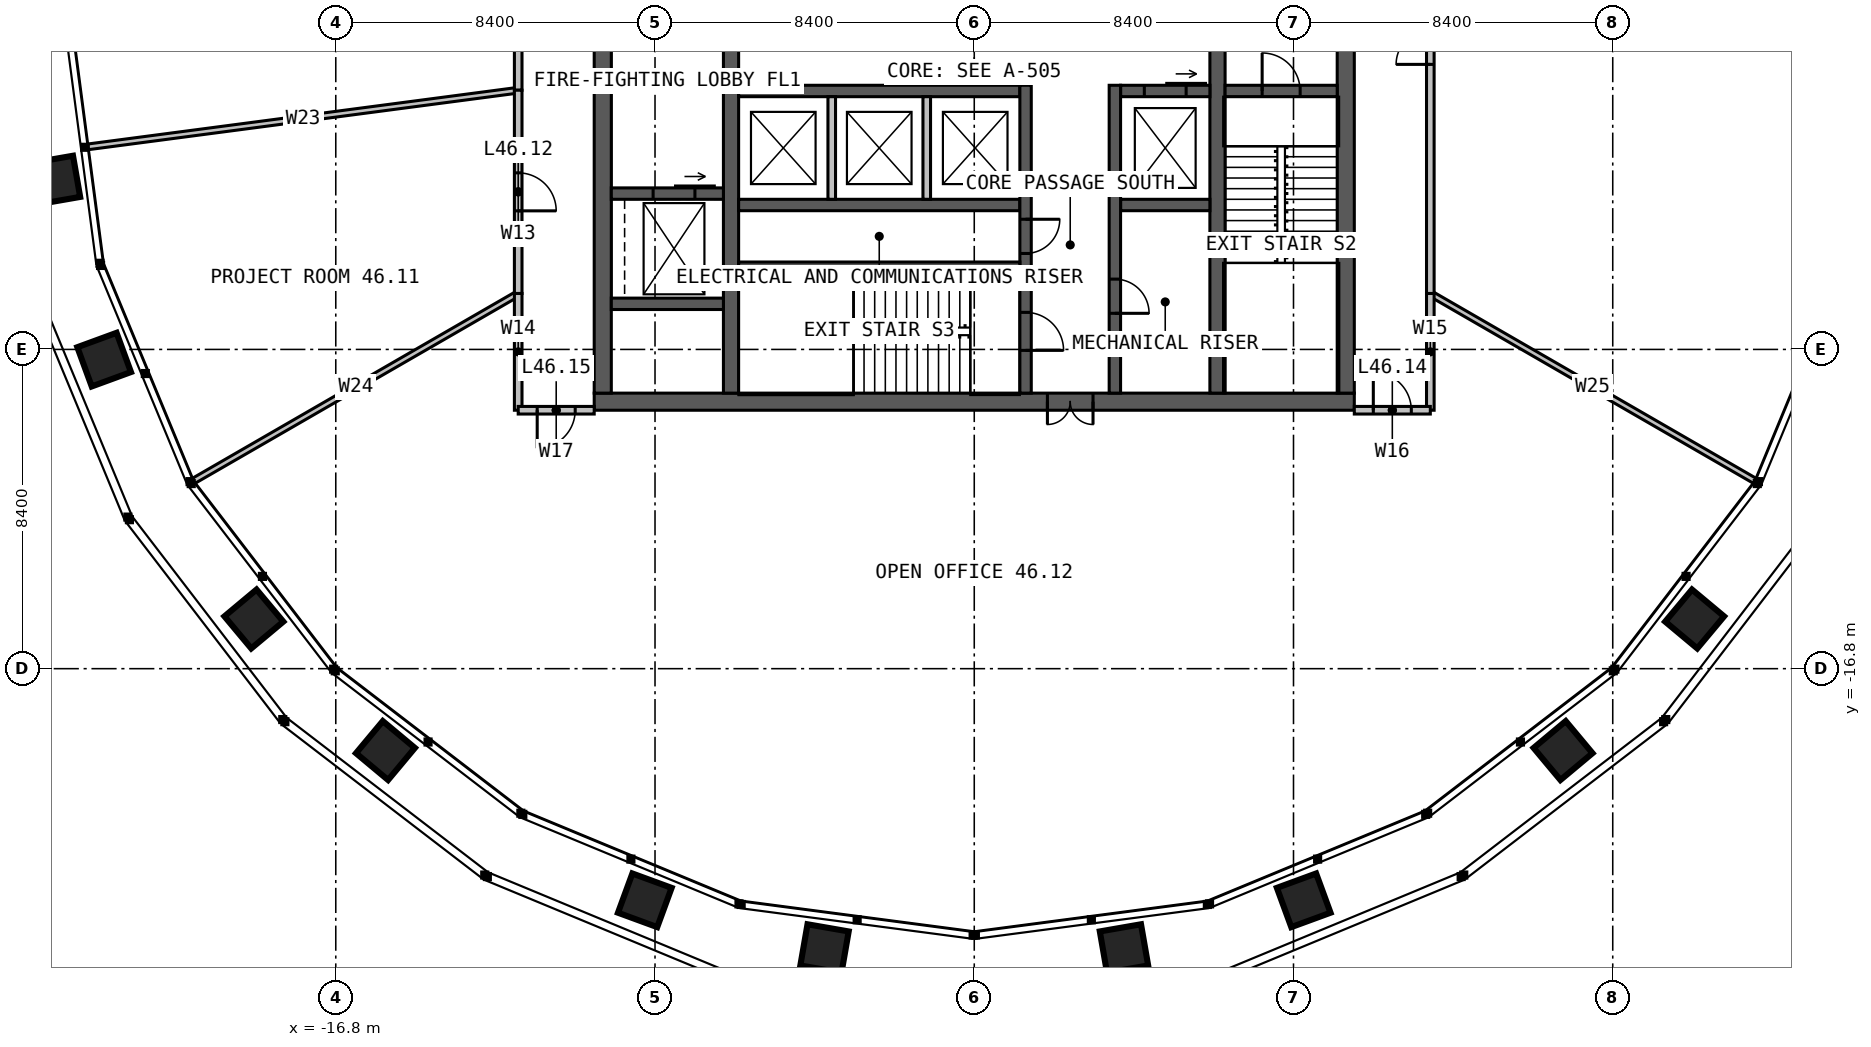
"""IFC4 building model, lengths in metres.
Left out: names, types, materials, properties, quantities, classifications, styles, units other than length and angle.
Written with IfcOpenShell. Run it as: python <this file> out.ifc"""

import sys

from ifc_helpers import new_model, si_unit, direction, frame, frame_2d, origin, place, context, subcontext, project, spatial, rectangle, extrude, element, fill, save


model = new_model("IFC4")
c1 = context("Model", 3, precision=1e-05, world=origin(), true_north=direction((0.0, 1.0)))
c2 = subcontext(c1, "Body", "Model", "MODEL_VIEW")
j1 = project(units=[si_unit("LENGTHUNIT", "METRE"), si_unit("PLANEANGLEUNIT", "RADIAN")], contexts=[c1])
p1 = place(None, origin())
s1 = spatial("IfcSite", under=j1, at=p1, CompositionType="ELEMENT")
p2 = place(p1, origin())
s2 = spatial("IfcBuilding", under=s1, at=p2, CompositionType="ELEMENT")
p3 = place(p2, frame((0.0, 0.0, 191.0)))
s3 = spatial("IfcBuildingStorey", under=s2, at=p3, CompositionType="ELEMENT", Elevation=191.0)
p4 = place(p3, frame((10.0, -9.775, 0.0), z_axis=(0.0, 0.0, 1.0), x_axis=(-1.0, 0.0, 0.0)))
e1 = element("IfcWall", 1, at=p4, inside=s3, PredefinedType="SOLIDWALL", context=c2, shape_type="SweptSolid", body=[
    extrude(rectangle(XDim=20.0, YDim=0.45, at=frame_2d((10.0, 0.0))), origin(), (0.0, 0.0, 1.0), 4.0),
])
p5 = place(p4, frame((6.875, 0.0, 0.0)))
e2 = element("IfcOpeningElement", 2, at=p5, cuts=e1, PredefinedType="OPENING", context=c2, shape_type="SweptSolid", body=[
    extrude(rectangle(XDim=1.2, YDim=2.2, at=frame_2d((0.6, 1.1))), frame((0.0, 0.235, 0.0), z_axis=(0.0, -1.0, 0.0), x_axis=(1.0, 0.0, 0.0)), (0.0, 0.0, 1.0), 0.47),
])
for number, where, z_axis, x_axis in (
    (3, (9.775, -9.55, 0.0), (0.0, 0.0, 1.0), (0.0, 1.0, 0.0)),
    (4, (-9.775, 9.55, 0.0), (0.0, 0.0, 1.0), (0.0, -1.0, 0.0)),
):
    element("IfcWall", number, at=place(p3, frame(where, z_axis=z_axis, x_axis=x_axis)), inside=s3, PredefinedType="SOLIDWALL", context=c2, shape_type="SweptSolid", body=[
        extrude(rectangle(XDim=19.1, YDim=0.45, at=frame_2d((9.55, 0.0))), origin(), (0.0, 0.0, 1.0), 4.0),
    ])
p6 = place(p3, frame((-6.4, -9.55, 0.0), z_axis=(0.0, 0.0, 1.0), x_axis=(0.0, 1.0, 0.0)))
e5 = element("IfcWall", 5, at=p6, inside=s3, PredefinedType="SOLIDWALL", context=c2, shape_type="SweptSolid", body=[
    extrude(rectangle(XDim=19.1, YDim=0.4, at=frame_2d((9.55, 0.0))), origin(), (0.0, 0.0, 1.0), 4.0),
])
p7 = place(p6, frame((9.05, 0.0, 0.0)))
e6 = element("IfcOpeningElement", 6, at=p7, cuts=e5, PredefinedType="OPENING", context=c2, shape_type="SweptSolid", body=[
    extrude(rectangle(XDim=1.0, YDim=2.2, at=frame_2d((0.5, 1.1))), frame((0.0, 0.21, 0.0), z_axis=(0.0, -1.0, 0.0), x_axis=(1.0, 0.0, 0.0)), (0.0, 0.0, 1.0), 0.42),
])
p8 = place(p3, frame((6.4, 9.55, 0.0), z_axis=(0.0, 0.0, 1.0), x_axis=(0.0, -1.0, 0.0)))
e7 = element("IfcWall", 7, at=p8, inside=s3, PredefinedType="SOLIDWALL", context=c2, shape_type="SweptSolid", body=[
    extrude(rectangle(XDim=19.1, YDim=0.4, at=frame_2d((9.55, 0.0))), origin(), (0.0, 0.0, 1.0), 4.0),
])
p9 = place(p8, frame((9.05, 0.0, 0.0)))
e8 = element("IfcOpeningElement", 8, at=p9, cuts=e7, PredefinedType="OPENING", context=c2, shape_type="SweptSolid", body=[
    extrude(rectangle(XDim=1.0, YDim=2.2, at=frame_2d((0.5, 1.1))), frame((0.0, 0.21, 0.0), z_axis=(0.0, -1.0, 0.0), x_axis=(1.0, 0.0, 0.0)), (0.0, 0.0, 1.0), 0.42),
])
p10 = place(p3, frame((-6.2, -1.6, 0.0), z_axis=(0.0, 0.0, 1.0), x_axis=(1.0, 0.0, 0.0)))
e9 = element("IfcWall", 9, at=p10, inside=s3, PredefinedType="SOLIDWALL", context=c2, shape_type="SweptSolid", body=[
    extrude(rectangle(XDim=7.4, YDim=0.3, at=frame_2d((3.7, 0.0))), origin(), (0.0, 0.0, 1.0), 4.0),
])
p11 = place(p3, frame((3.85, -1.6, 0.0), z_axis=(0.0, 0.0, 1.0), x_axis=(1.0, 0.0, 0.0)))
e10 = element("IfcWall", 10, at=p11, inside=s3, PredefinedType="SOLIDWALL", context=c2, shape_type="SweptSolid", body=[
    extrude(rectangle(XDim=2.35, YDim=0.3, at=frame_2d((1.175, 0.0))), origin(), (0.0, 0.0, 1.0), 4.0),
])
p12 = place(p11, frame((0.625, 0.0, 0.0)))
e11 = element("IfcOpeningElement", 11, at=p12, cuts=e10, PredefinedType="OPENING", context=c2, shape_type="SweptSolid", body=[
    extrude(rectangle(XDim=1.1, YDim=2.2, at=frame_2d((0.55, 1.1))), frame((0.0, 0.16, 0.0), z_axis=(0.0, -1.0, 0.0), x_axis=(1.0, 0.0, 0.0)), (0.0, 0.0, 1.0), 0.32),
])
p13 = place(p3, frame((-6.2, -4.6, 0.0), z_axis=(0.0, 0.0, 1.0), x_axis=(1.0, 0.0, 0.0)))
e12 = element("IfcWall", 12, at=p13, inside=s3, PredefinedType="SOLIDWALL", context=c2, shape_type="SweptSolid", body=[
    extrude(rectangle(XDim=7.4, YDim=0.3, at=frame_2d((3.7, 0.0))), origin(), (0.0, 0.0, 1.0), 4.0),
])
p14 = place(p3, frame((3.85, -4.6, 0.0), z_axis=(0.0, 0.0, 1.0), x_axis=(1.0, 0.0, 0.0)))
e13 = element("IfcWall", 13, at=p14, inside=s3, PredefinedType="SOLIDWALL", context=c2, shape_type="SweptSolid", body=[
    extrude(rectangle(XDim=2.35, YDim=0.3, at=frame_2d((1.175, 0.0))), origin(), (0.0, 0.0, 1.0), 4.0),
])
p15 = place(p3, frame((1.35, -1.45, 0.0), z_axis=(0.0, 0.0, 1.0), x_axis=(0.0, -1.0, 0.0)))
e14 = element("IfcWall", 14, at=p15, inside=s3, PredefinedType="SOLIDWALL", context=c2, shape_type="SweptSolid", body=[
    extrude(rectangle(XDim=8.1, YDim=0.3, at=frame_2d((4.05, 0.0))), origin(), (0.0, 0.0, 1.0), 4.0),
])
p16 = place(p15, frame((5.975, 0.0, 0.0)))
e15 = element("IfcOpeningElement", 15, at=p16, cuts=e14, PredefinedType="OPENING", context=c2, shape_type="SweptSolid", body=[
    extrude(rectangle(XDim=1.0, YDim=2.2, at=frame_2d((0.5, 1.1))), frame((0.0, 0.16, 0.0), z_axis=(0.0, -1.0, 0.0), x_axis=(1.0, 0.0, 0.0)), (0.0, 0.0, 1.0), 0.32),
])
p17 = place(p15, frame((3.525, 0.0, 0.0)))
e16 = element("IfcOpeningElement", 16, at=p17, cuts=e14, PredefinedType="OPENING", context=c2, shape_type="SweptSolid", body=[
    extrude(rectangle(XDim=0.9, YDim=2.2, at=frame_2d((0.45, 1.1))), frame((0.0, 0.16, 0.0), z_axis=(0.0, -1.0, 0.0), x_axis=(1.0, 0.0, 0.0)), (0.0, 0.0, 1.0), 0.32),
])
p18 = place(p3, frame((3.7, -1.45, 0.0), z_axis=(0.0, 0.0, 1.0), x_axis=(0.0, -1.0, 0.0)))
e17 = element("IfcWall", 17, at=p18, inside=s3, PredefinedType="SOLIDWALL", context=c2, shape_type="SweptSolid", body=[
    extrude(rectangle(XDim=8.1, YDim=0.3, at=frame_2d((4.05, 0.0))), origin(), (0.0, 0.0, 1.0), 4.0),
])
p19 = place(p18, frame((5.1, 0.0, 0.0)))
e18 = element("IfcOpeningElement", 18, at=p19, cuts=e17, PredefinedType="OPENING", context=c2, shape_type="SweptSolid", body=[
    extrude(rectangle(XDim=0.9, YDim=2.2, at=frame_2d((0.45, 1.1))), frame((0.0, 0.16, 0.0), z_axis=(0.0, -1.0, 0.0), x_axis=(1.0, 0.0, 0.0)), (0.0, 0.0, 1.0), 0.32),
])
p20 = place(p3, frame((-6.2, -6.2, 0.0), z_axis=(0.0, 0.0, 1.0), x_axis=(1.0, 0.0, 0.0)))
e19 = element("IfcWall", 19, at=p20, inside=s3, PredefinedType="SOLIDWALL", context=c2, shape_type="SweptSolid", body=[
    extrude(rectangle(XDim=7.4, YDim=0.2, at=frame_2d((3.7, 0.0))), origin(), (0.0, 0.0, 1.0), 4.0),
])
p21 = place(p3, frame((6.6, -1.6, 0.0), z_axis=(0.0, 0.0, 1.0), x_axis=(1.0, 0.0, 0.0)))
e20 = element("IfcWall", 20, at=p21, inside=s3, PredefinedType="SOLIDWALL", context=c2, shape_type="SweptSolid", body=[
    extrude(rectangle(XDim=2.95, YDim=0.3, at=frame_2d((1.475, 0.0))), origin(), (0.0, 0.0, 1.0), 4.0),
])
p22 = place(p21, frame((0.975, 0.0, 0.0)))
e21 = element("IfcOpeningElement", 21, at=p22, cuts=e20, PredefinedType="OPENING", context=c2, shape_type="SweptSolid", body=[
    extrude(rectangle(XDim=1.0, YDim=2.2, at=frame_2d((0.5, 1.1))), frame((0.0, 0.16, 0.0), z_axis=(0.0, -1.0, 0.0), x_axis=(1.0, 0.0, 0.0)), (0.0, 0.0, 1.0), 0.32),
])
p23 = place(p3, frame((-9.55, -4.3, 0.0), z_axis=(0.0, 0.0, 1.0), x_axis=(1.0, 0.0, 0.0)))
e22 = element("IfcWall", 22, at=p23, inside=s3, PredefinedType="SOLIDWALL", context=c2, shape_type="SweptSolid", body=[
    extrude(rectangle(XDim=2.95, YDim=0.3, at=frame_2d((1.475, 0.0))), origin(), (0.0, 0.0, 1.0), 4.0),
])
p24 = place(p23, frame((1.1, 0.0, 0.0)))
e23 = element("IfcOpeningElement", 23, at=p24, cuts=e22, PredefinedType="OPENING", context=c2, shape_type="SweptSolid", body=[
    extrude(rectangle(XDim=1.1, YDim=2.2, at=frame_2d((0.55, 1.1))), frame((0.0, 0.16, 0.0), z_axis=(0.0, -1.0, 0.0), x_axis=(1.0, 0.0, 0.0)), (0.0, 0.0, 1.0), 0.32),
])
p25 = place(p3, frame((-9.55, -7.2, 0.0), z_axis=(0.0, 0.0, 1.0), x_axis=(1.0, 0.0, 0.0)))
e24 = element("IfcWall", 24, at=p25, inside=s3, PredefinedType="SOLIDWALL", context=c2, shape_type="SweptSolid", body=[
    extrude(rectangle(XDim=2.95, YDim=0.3, at=frame_2d((1.475, 0.0))), origin(), (0.0, 0.0, 1.0), 4.0),
])
for number, where, z_axis, x_axis in (
    (25, (-3.75, -1.75, 0.0), (0.0, 0.0, 1.0), (0.0, -1.0, 0.0)),
    (26, (-1.25, -1.75, 0.0), (0.0, 0.0, 1.0), (0.0, -1.0, 0.0)),
):
    element("IfcWall", number, at=place(p3, frame(where, z_axis=z_axis, x_axis=x_axis)), inside=s3, PredefinedType="SOLIDWALL", context=c2, shape_type="SweptSolid", body=[
        extrude(rectangle(XDim=2.7, YDim=0.2, at=frame_2d((1.35, 0.0))), origin(), (0.0, 0.0, 1.0), 3.75),
    ])
p26 = place(p3, frame((12.0, -6.928, 0.0), z_axis=(0.0, 0.0, 1.0), x_axis=(0.866027739639, -0.49999595416, 0.0)))
e27 = element("IfcWall", 27, at=p26, inside=s3, PredefinedType="PARTITIONING", context=c2, shape_type="SweptSolid", body=[
    extrude(rectangle(XDim=9.865, YDim=0.15, at=frame_2d((4.932, 0.0))), origin(), (0.0, 0.0, 1.0), 2.79),
])
p27 = place(p3, frame((-12.0, -1.58, 0.0), z_axis=(0.0, 0.0, 1.0), x_axis=(-0.991444173628, -0.130531416064, 0.0)))
e28 = element("IfcWall", 28, at=p27, inside=s3, PredefinedType="PARTITIONING", context=c2, shape_type="SweptSolid", body=[
    extrude(rectangle(XDim=11.415, YDim=0.15, at=frame_2d((5.708, 0.0))), origin(), (0.0, 0.0, 1.0), 2.79),
])
p28 = place(p3, frame((-12.0, -6.928, 0.0), z_axis=(0.0, 0.0, 1.0), x_axis=(-0.866027739639, -0.49999595416, 0.0)))
e29 = element("IfcWall", 29, at=p28, inside=s3, PredefinedType="PARTITIONING", context=c2, shape_type="SweptSolid", body=[
    extrude(rectangle(XDim=9.865, YDim=0.15, at=frame_2d((4.932, 0.0))), origin(), (0.0, 0.0, 1.0), 2.79),
])
p29 = place(p3, frame((12.0, -6.928, 0.0), z_axis=(0.0, 0.0, 1.0), x_axis=(0.0, 1.0, 0.0)))
e30 = element("IfcWall", 30, at=p29, inside=s3, PredefinedType="PARTITIONING", context=c2, shape_type="SweptSolid", body=[
    extrude(rectangle(XDim=13.856, YDim=0.2, at=frame_2d((6.928, 0.0))), origin(), (0.0, 0.0, 1.0), 3.8),
])
p30 = place(p29, frame((6.028, 0.0, 0.0)))
e31 = element("IfcOpeningElement", 31, at=p30, cuts=e30, PredefinedType="OPENING", context=c2, shape_type="SweptSolid", body=[
    extrude(rectangle(XDim=1.8, YDim=2.2, at=frame_2d((0.9, 1.1))), frame((0.0, 0.11, 0.0), z_axis=(0.0, -1.0, 0.0), x_axis=(1.0, 0.0, 0.0)), (0.0, 0.0, 1.0), 0.22),
])
p31 = place(p3, frame((-12.0, 6.928, 0.0), z_axis=(0.0, 0.0, 1.0), x_axis=(0.0, -1.0, 0.0)))
e32 = element("IfcWall", 32, at=p31, inside=s3, PredefinedType="PARTITIONING", context=c2, shape_type="SweptSolid", body=[
    extrude(rectangle(XDim=8.508, YDim=0.2, at=frame_2d((4.254, 0.0))), origin(), (0.0, 0.0, 1.0), 3.8),
])
p32 = place(p31, frame((3.354, 0.0, 0.0)))
e33 = element("IfcOpeningElement", 33, at=p32, cuts=e32, PredefinedType="OPENING", context=c2, shape_type="SweptSolid", body=[
    extrude(rectangle(XDim=1.8, YDim=2.2, at=frame_2d((0.9, 1.1))), frame((0.0, 0.11, 0.0), z_axis=(0.0, -1.0, 0.0), x_axis=(1.0, 0.0, 0.0)), (0.0, 0.0, 1.0), 0.22),
])
p33 = place(p3, frame((-12.0, -1.58, 0.0), z_axis=(0.0, 0.0, 1.0), x_axis=(0.0, -1.0, 0.0)))
e34 = element("IfcWall", 34, at=p33, inside=s3, PredefinedType="PARTITIONING", context=c2, shape_type="SweptSolid", body=[
    extrude(rectangle(XDim=5.348, YDim=0.2, at=frame_2d((2.674, 0.0))), origin(), (0.0, 0.0, 1.0), 3.8),
])
p34 = place(p33, frame((2.174, 0.0, 0.0)))
e35 = element("IfcOpeningElement", 35, at=p34, cuts=e34, PredefinedType="OPENING", context=c2, shape_type="SweptSolid", body=[
    extrude(rectangle(XDim=1.0, YDim=2.2, at=frame_2d((0.5, 1.1))), frame((0.0, 0.11, 0.0), z_axis=(0.0, -1.0, 0.0), x_axis=(1.0, 0.0, 0.0)), (0.0, 0.0, 1.0), 0.22),
])
for number, where, z_axis, x_axis in (
    (36, (-12.0, -6.928, 0.0), (0.0, 0.0, 1.0), (0.0, -1.0, 0.0)),
    (37, (12.0, -10.0, 0.0), (0.0, 0.0, 1.0), (0.0, 1.0, 0.0)),
):
    element("IfcWall", number, at=place(p3, frame(where, z_axis=z_axis, x_axis=x_axis)), inside=s3, PredefinedType="PARTITIONING", context=c2, shape_type="SweptSolid", body=[
        extrude(rectangle(XDim=3.072, YDim=0.2, at=frame_2d((1.536, 0.0))), origin(), (0.0, 0.0, 1.0), 3.8),
    ])
p35 = place(p3, frame((10.0, -10.0, 0.0), z_axis=(0.0, 0.0, 1.0), x_axis=(1.0, 0.0, 0.0)))
e38 = element("IfcWall", 38, at=p35, inside=s3, PredefinedType="PARTITIONING", context=c2, shape_type="SweptSolid", body=[
    extrude(rectangle(XDim=2.0, YDim=0.2, at=frame_2d((1.0, 0.0))), origin(), (0.0, 0.0, 1.0), 3.8),
])
p36 = place(p35, frame((0.5, 0.0, 0.0)))
e39 = element("IfcOpeningElement", 39, at=p36, cuts=e38, PredefinedType="OPENING", context=c2, shape_type="SweptSolid", body=[
    extrude(rectangle(XDim=1.0, YDim=2.2, at=frame_2d((0.5, 1.1))), frame((0.0, 0.11, 0.0), z_axis=(0.0, -1.0, 0.0), x_axis=(1.0, 0.0, 0.0)), (0.0, 0.0, 1.0), 0.22),
])
p37 = place(p3, frame((-10.0, -10.0, 0.0), z_axis=(0.0, 0.0, 1.0), x_axis=(-1.0, 0.0, 0.0)))
e40 = element("IfcWall", 40, at=p37, inside=s3, PredefinedType="PARTITIONING", context=c2, shape_type="SweptSolid", body=[
    extrude(rectangle(XDim=2.0, YDim=0.2, at=frame_2d((1.0, 0.0))), origin(), (0.0, 0.0, 1.0), 3.8),
])
p38 = place(p37, frame((0.5, 0.0, 0.0)))
e41 = element("IfcOpeningElement", 41, at=p38, cuts=e40, PredefinedType="OPENING", context=c2, shape_type="SweptSolid", body=[
    extrude(rectangle(XDim=1.0, YDim=2.2, at=frame_2d((0.5, 1.1))), frame((0.0, 0.11, 0.0), z_axis=(0.0, -1.0, 0.0), x_axis=(1.0, 0.0, 0.0)), (0.0, 0.0, 1.0), 0.22),
])
p39 = place(p5, origin())
e42 = element("IfcDoor", 42, at=p39, inside=s3, OperationType="DOUBLE_DOOR_SINGLE_SWING", PredefinedType="DOOR", context=c2, shape_type="SweptSolid", body=[
    extrude(rectangle(XDim=1.2, YDim=2.2, at=frame_2d((0.6, 1.1))), frame((0.0, 0.025, 0.0), z_axis=(0.0, -1.0, 0.0), x_axis=(1.0, 0.0, 0.0)), (0.0, 0.0, 1.0), 0.05),
])
fill(e2, e42)
p40 = place(p22, origin())
e43 = element("IfcDoor", 43, at=p40, inside=s3, OperationType="SINGLE_SWING_LEFT", PredefinedType="DOOR", context=c2, shape_type="SweptSolid", body=[
    extrude(rectangle(XDim=1.0, YDim=2.2, at=frame_2d((0.5, 1.1))), frame((0.0, 0.025, 0.0), z_axis=(0.0, -1.0, 0.0), x_axis=(1.0, 0.0, 0.0)), (0.0, 0.0, 1.0), 0.05),
])
fill(e21, e43)
p41 = place(p16, origin())
e44 = element("IfcDoor", 44, at=p41, inside=s3, OperationType="SINGLE_SWING_RIGHT", PredefinedType="DOOR", context=c2, shape_type="SweptSolid", body=[
    extrude(rectangle(XDim=1.0, YDim=2.2, at=frame_2d((0.5, 1.1))), frame((0.0, 0.025, 0.0), z_axis=(0.0, -1.0, 0.0), x_axis=(1.0, 0.0, 0.0)), (0.0, 0.0, 1.0), 0.05),
])
fill(e15, e44)
p42 = place(p17, origin())
e45 = element("IfcDoor", 45, at=p42, inside=s3, OperationType="SINGLE_SWING_LEFT", PredefinedType="DOOR", context=c2, shape_type="SweptSolid", body=[
    extrude(rectangle(XDim=0.9, YDim=2.2, at=frame_2d((0.45, 1.1))), frame((0.0, 0.025, 0.0), z_axis=(0.0, -1.0, 0.0), x_axis=(1.0, 0.0, 0.0)), (0.0, 0.0, 1.0), 0.05),
])
fill(e16, e45)
p43 = place(p19, origin())
e46 = element("IfcDoor", 46, at=p43, inside=s3, OperationType="SINGLE_SWING_RIGHT", PredefinedType="DOOR", context=c2, shape_type="SweptSolid", body=[
    extrude(rectangle(XDim=0.9, YDim=2.2, at=frame_2d((0.45, 1.1))), frame((0.0, 0.025, 0.0), z_axis=(0.0, -1.0, 0.0), x_axis=(1.0, 0.0, 0.0)), (0.0, 0.0, 1.0), 0.05),
])
fill(e18, e46)
p44 = place(p12, origin())
e47 = element("IfcDoor", 47, at=p44, inside=s3, OperationType="SLIDING_TO_LEFT", PredefinedType="DOOR", context=c2, shape_type="SweptSolid", body=[
    extrude(rectangle(XDim=1.1, YDim=2.2, at=frame_2d((0.55, 1.1))), frame((0.0, 0.025, 0.0), z_axis=(0.0, -1.0, 0.0), x_axis=(1.0, 0.0, 0.0)), (0.0, 0.0, 1.0), 0.05),
])
fill(e11, e47)
p45 = place(p24, origin())
e48 = element("IfcDoor", 48, at=p45, inside=s3, OperationType="SLIDING_TO_LEFT", PredefinedType="DOOR", context=c2, shape_type="SweptSolid", body=[
    extrude(rectangle(XDim=1.1, YDim=2.2, at=frame_2d((0.55, 1.1))), frame((0.0, 0.025, 0.0), z_axis=(0.0, -1.0, 0.0), x_axis=(1.0, 0.0, 0.0)), (0.0, 0.0, 1.0), 0.05),
])
fill(e23, e48)
p46 = place(p30, origin())
e49 = element("IfcDoor", 49, at=p46, inside=s3, OperationType="DOUBLE_DOOR_SINGLE_SWING", PredefinedType="DOOR", context=c2, shape_type="SweptSolid", body=[
    extrude(rectangle(XDim=1.8, YDim=2.2, at=frame_2d((0.9, 1.1))), frame((0.0, 0.025, 0.0), z_axis=(0.0, -1.0, 0.0), x_axis=(1.0, 0.0, 0.0)), (0.0, 0.0, 1.0), 0.05),
])
fill(e31, e49)
p47 = place(p34, origin())
e50 = element("IfcDoor", 50, at=p47, inside=s3, OperationType="SINGLE_SWING_RIGHT", PredefinedType="DOOR", context=c2, shape_type="SweptSolid", body=[
    extrude(rectangle(XDim=1.0, YDim=2.2, at=frame_2d((0.5, 1.1))), frame((0.0, 0.025, 0.0), z_axis=(0.0, -1.0, 0.0), x_axis=(1.0, 0.0, 0.0)), (0.0, 0.0, 1.0), 0.05),
])
fill(e35, e50)
p48 = place(p36, origin())
e51 = element("IfcDoor", 51, at=p48, inside=s3, OperationType="SINGLE_SWING_LEFT", PredefinedType="DOOR", context=c2, shape_type="SweptSolid", body=[
    extrude(rectangle(XDim=1.0, YDim=2.2, at=frame_2d((0.5, 1.1))), frame((0.0, 0.025, 0.0), z_axis=(0.0, -1.0, 0.0), x_axis=(1.0, 0.0, 0.0)), (0.0, 0.0, 1.0), 0.05),
])
fill(e39, e51)
p49 = place(p38, origin())
e52 = element("IfcDoor", 52, at=p49, inside=s3, OperationType="SINGLE_SWING_RIGHT", PredefinedType="DOOR", context=c2, shape_type="SweptSolid", body=[
    extrude(rectangle(XDim=1.0, YDim=2.2, at=frame_2d((0.5, 1.1))), frame((0.0, 0.025, 0.0), z_axis=(0.0, -1.0, 0.0), x_axis=(1.0, 0.0, 0.0)), (0.0, 0.0, 1.0), 0.05),
])
fill(e41, e52)
save(model, sys.argv[1])
